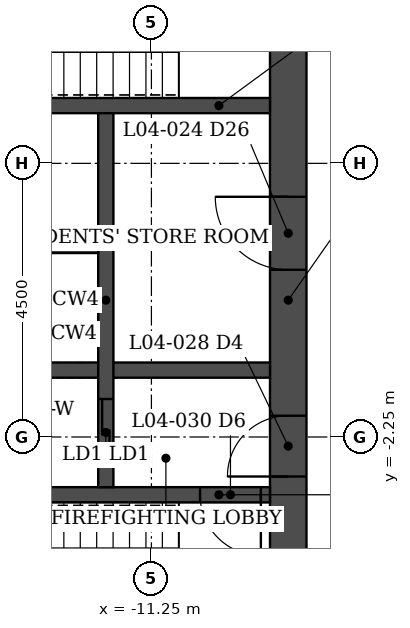
"""IFC4 building model, lengths in metres.
Left out: names, types, materials, properties, quantities, classifications, styles, units other than length and angle.
Written with IfcOpenShell. Run it as: python <this file> out.ifc"""

import sys

from ifc_helpers import new_model, si_unit, direction, frame, frame_2d, origin, place, context, subcontext, project, spatial, rectangle, extrude, element, fill, save


model = new_model("IFC4")
c1 = context("Model", 3, precision=1e-05, world=origin(), true_north=direction((0.0, 1.0)))
c2 = subcontext(c1, "Body", "Model", "MODEL_VIEW")
j1 = project(units=[si_unit("LENGTHUNIT", "METRE"), si_unit("PLANEANGLEUNIT", "RADIAN")], contexts=[c1])
p1 = place(None, origin())
s1 = spatial("IfcSite", under=j1, at=p1, CompositionType="ELEMENT")
p2 = place(p1, origin())
s2 = spatial("IfcBuilding", under=s1, at=p2, CompositionType="ELEMENT")
p3 = place(p2, frame((0.0, 0.0, 21.5)))
s3 = spatial("IfcBuildingStorey", under=s2, at=p3, CompositionType="ELEMENT", Elevation=21.5)
p4 = place(p3, frame((-9.0, -6.45, 0.0), z_axis=(0.0, 0.0, 1.0), x_axis=(0.0, 1.0, 0.0)))
e1 = element("IfcWall", 1, at=p4, inside=s3, PredefinedType="SHEAR", context=c2, shape_type="SweptSolid", body=[
    extrude(rectangle(XDim=12.9, YDim=0.6, at=frame_2d((6.45, 0.0))), origin(), (0.0, 0.0, 1.0), 5.0),
])
p5 = place(p4, frame((3.55, 0.0, 0.0)))
e2 = element("IfcOpeningElement", 2, at=p5, cuts=e1, PredefinedType="OPENING", context=c2, shape_type="SweptSolid", body=[
    extrude(rectangle(XDim=1.0, YDim=2.1, at=frame_2d((0.5, 1.05))), frame((0.0, 0.31, 0.0), z_axis=(0.0, -1.0, 0.0), x_axis=(1.0, 0.0, 0.0)), (0.0, 0.0, 1.0), 0.62),
])
p6 = place(p4, frame((6.95, 0.0, 0.0)))
e3 = element("IfcOpeningElement", 3, at=p6, cuts=e1, PredefinedType="OPENING", context=c2, shape_type="SweptSolid", body=[
    extrude(rectangle(XDim=1.2, YDim=2.1, at=frame_2d((0.6, 1.05))), frame((0.0, 0.31, 0.0), z_axis=(0.0, -1.0, 0.0), x_axis=(1.0, 0.0, 0.0)), (0.0, 0.0, 1.0), 0.62),
])
p7 = place(p4, frame((10.85, 0.0, 0.0)))
e4 = element("IfcOpeningElement", 4, at=p7, cuts=e1, PredefinedType="OPENING", context=c2, shape_type="SweptSolid", body=[
    extrude(rectangle(XDim=1.0, YDim=2.1, at=frame_2d((0.5, 1.05))), frame((0.0, 0.31, 0.0), z_axis=(0.0, -1.0, 0.0), x_axis=(1.0, 0.0, 0.0)), (0.0, 0.0, 1.0), 0.62),
])
p8 = place(p3, frame((-9.3, -3.2, 0.0), z_axis=(0.0, 0.0, 1.0), x_axis=(-1.0, 0.0, 0.0)))
e5 = element("IfcWall", 5, at=p8, inside=s3, PredefinedType="SHEAR", context=c2, shape_type="SweptSolid", body=[
    extrude(rectangle(XDim=8.4, YDim=0.25, at=frame_2d((4.2, 0.0))), origin(), (0.0, 0.0, 1.0), 5.0),
])
p9 = place(p8, frame((0.15, 0.0, 0.0)))
e6 = element("IfcOpeningElement", 6, at=p9, cuts=e5, PredefinedType="OPENING", context=c2, shape_type="SweptSolid", body=[
    extrude(rectangle(XDim=1.0, YDim=2.1, at=frame_2d((0.5, 1.05))), frame((0.0, 0.135, 0.0), z_axis=(0.0, -1.0, 0.0), x_axis=(1.0, 0.0, 0.0)), (0.0, 0.0, 1.0), 0.27),
])
p10 = place(p3, frame((-9.3, 3.2, 0.0), z_axis=(0.0, 0.0, 1.0), x_axis=(-1.0, 0.0, 0.0)))
e7 = element("IfcWall", 7, at=p10, inside=s3, PredefinedType="SHEAR", context=c2, shape_type="SweptSolid", body=[
    extrude(rectangle(XDim=8.4, YDim=0.25, at=frame_2d((4.2, 0.0))), origin(), (0.0, 0.0, 1.0), 5.0),
])
p11 = place(p3, frame((-9.3, -1.15, 0.0), z_axis=(0.0, 0.0, 1.0), x_axis=(-1.0, 0.0, 0.0)))
e8 = element("IfcWall", 8, at=p11, inside=s3, PredefinedType="SHEAR", context=c2, shape_type="SweptSolid", body=[
    extrude(rectangle(XDim=5.375, YDim=0.25, at=frame_2d((2.688, 0.0))), origin(), (0.0, 0.0, 1.0), 5.0),
])
p12 = place(p3, frame((-12.0, -3.075, 0.0), z_axis=(0.0, 0.0, 1.0), x_axis=(0.0, 1.0, 0.0)))
e9 = element("IfcWall", 9, at=p12, inside=s3, PredefinedType="SHEAR", context=c2, shape_type="SweptSolid", body=[
    extrude(rectangle(XDim=6.15, YDim=0.25, at=frame_2d((3.075, 0.0))), origin(), (0.0, 0.0, 1.0), 5.0),
])
p13 = place(p12, frame((0.35, 0.0, 0.0)))
e10 = element("IfcOpeningElement", 10, at=p13, cuts=e9, PredefinedType="OPENING", context=c2, shape_type="SweptSolid", body=[
    extrude(rectangle(XDim=1.1, YDim=2.1, at=frame_2d((0.55, 1.05))), frame((0.0, 0.135, 0.0), z_axis=(0.0, -1.0, 0.0), x_axis=(1.0, 0.0, 0.0)), (0.0, 0.0, 1.0), 0.27),
])
p14 = place(p3, frame((-12.125, 0.9, 0.0), z_axis=(0.0, 0.0, 1.0), x_axis=(-1.0, 0.0, 0.0)))
e11 = element("IfcWall", 11, at=p14, inside=s3, PredefinedType="SHEAR", context=c2, shape_type="SweptSolid", body=[
    extrude(rectangle(XDim=2.55, YDim=0.25, at=frame_2d((1.275, 0.0))), origin(), (0.0, 0.0, 1.0), 5.0),
])
p15 = place(p5, origin())
e12 = element("IfcDoor", 12, at=p15, inside=s3, OperationType="SINGLE_SWING_LEFT", PredefinedType="DOOR", context=c2, shape_type="SweptSolid", body=[
    extrude(rectangle(XDim=1.0, YDim=2.1, at=frame_2d((0.5, 1.05))), frame((0.0, 0.025, 0.0), z_axis=(0.0, -1.0, 0.0), x_axis=(1.0, 0.0, 0.0)), (0.0, 0.0, 1.0), 0.05),
])
fill(e2, e12)
p16 = place(p9, origin())
e13 = element("IfcDoor", 13, at=p16, inside=s3, OperationType="SINGLE_SWING_LEFT", PredefinedType="DOOR", context=c2, shape_type="SweptSolid", body=[
    extrude(rectangle(XDim=1.0, YDim=2.1, at=frame_2d((0.5, 1.05))), frame((0.0, 0.025, 0.0), z_axis=(0.0, -1.0, 0.0), x_axis=(1.0, 0.0, 0.0)), (0.0, 0.0, 1.0), 0.05),
])
fill(e6, e13)
p17 = place(p6, origin())
e14 = element("IfcDoor", 14, at=p17, inside=s3, OperationType="SINGLE_SWING_RIGHT", PredefinedType="DOOR", context=c2, shape_type="SweptSolid", body=[
    extrude(rectangle(XDim=1.2, YDim=2.1, at=frame_2d((0.6, 1.05))), frame((0.0, 0.025, 0.0), z_axis=(0.0, -1.0, 0.0), x_axis=(1.0, 0.0, 0.0)), (0.0, 0.0, 1.0), 0.05),
])
fill(e3, e14)
p18 = place(p13, origin())
e15 = element("IfcDoor", 15, at=p18, inside=s3, OperationType="DOUBLE_DOOR_SLIDING", PredefinedType="DOOR", context=c2, shape_type="SweptSolid", body=[
    extrude(rectangle(XDim=1.1, YDim=2.1, at=frame_2d((0.55, 1.05))), frame((0.0, 0.025, 0.0), z_axis=(0.0, -1.0, 0.0), x_axis=(1.0, 0.0, 0.0)), (0.0, 0.0, 1.0), 0.05),
])
fill(e10, e15)
save(model, sys.argv[1])
